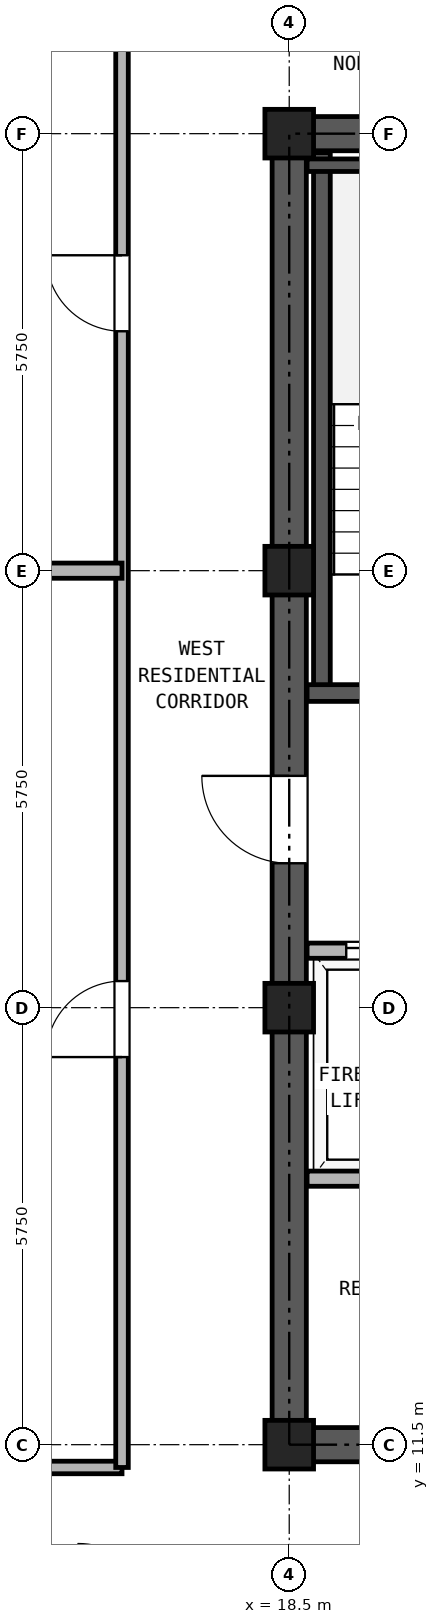
"""IFC4 building model, lengths in metres.
Left out: names, types, materials, properties, quantities, classifications, styles, units other than length and angle.
Written with IfcOpenShell. Run it as: python <this file> out.ifc"""

import sys

from ifc_helpers import new_model, si_unit, direction, frame, frame_2d, origin, origin_2d, place, context, subcontext, project, spatial, rectangle, hollow_rectangle, extrude, source, transform, mapped, element, fill, save


model = new_model("IFC4")
c1 = context("Model", 3, precision=1e-05, world=origin(), true_north=direction((0.0, 1.0)))
c2 = subcontext(c1, "Body", "Model", "MODEL_VIEW")
j1 = project(units=[si_unit("LENGTHUNIT", "METRE"), si_unit("PLANEANGLEUNIT", "RADIAN")], contexts=[c1])
p1 = place(None, origin())
s1 = spatial("IfcSite", under=j1, at=p1, CompositionType="ELEMENT")
p2 = place(p1, origin())
s2 = spatial("IfcBuilding", under=s1, at=p2, CompositionType="ELEMENT")
p3 = place(p2, frame((0.0, 0.0, 181.7)))
s3 = spatial("IfcBuildingStorey", under=s2, at=p3, CompositionType="ELEMENT", Elevation=181.7)
m1 = source(origin(), c2, "Body", "SweptSolid", [
    extrude(hollow_rectangle(XDim=0.64, YDim=0.64, WallThickness=0.035, at=origin_2d()), origin(), (0.0, 0.0, 1.0), 2.95),
])
for number, where, z_axis, x_axis in (
    (1, (18.5, 11.5, 0.0), (0.0, 0.0, 1.0), (1.0, 0.0, 0.0)),
    (2, (18.5, 17.25, 0.0), (0.0, 0.0, 1.0), (1.0, 0.0, 0.0)),
    (3, (18.5, 23.0, 0.0), (0.0, 0.0, 1.0), (1.0, 0.0, 0.0)),
    (4, (18.5, 28.75, 0.0), (0.0, 0.0, 1.0), (1.0, 0.0, 0.0)),
):
    element("IfcColumn", number, at=place(p3, frame(where, z_axis=z_axis, x_axis=x_axis)), inside=s3, PredefinedType="COLUMN", context=c2, shape_type="MappedRepresentation", body=[
        mapped(m1, transform((0.0, 0.0, 0.0), x_axis=(1.0, 0.0, 0.0), y_axis=(0.0, 1.0, 0.0), z_axis=(0.0, 0.0, 1.0), scale=1.0)),
    ])
p4 = place(p3, frame((18.275, 11.5, 0.0), z_axis=(0.0, 0.0, 1.0), x_axis=(1.0, 0.0, 0.0)))
e5 = element("IfcWall", 5, at=p4, inside=s3, PredefinedType="SHEAR", context=c2, shape_type="SweptSolid", body=[
    extrude(rectangle(XDim=10.45, YDim=0.45, at=frame_2d((5.225, 0.0))), origin(), (0.0, 0.0, 1.0), 2.95),
])
p5 = place(p4, frame((1.825, 0.0, 0.0)))
e6 = element("IfcOpeningElement", 6, at=p5, cuts=e5, PredefinedType="OPENING", context=c2, shape_type="SweptSolid", body=[
    extrude(rectangle(XDim=0.95, YDim=2.15, at=frame_2d((0.475, 1.075))), frame((0.0, 0.235, 0.0), z_axis=(0.0, -1.0, 0.0), x_axis=(1.0, 0.0, 0.0)), (0.0, 0.0, 1.0), 0.47),
])
p6 = place(p4, frame((5.325, 0.0, 0.0)))
e7 = element("IfcOpeningElement", 7, at=p6, cuts=e5, PredefinedType="OPENING", context=c2, shape_type="SweptSolid", body=[
    extrude(rectangle(XDim=0.95, YDim=2.15, at=frame_2d((0.475, 1.075))), frame((0.0, 0.235, 0.0), z_axis=(0.0, -1.0, 0.0), x_axis=(1.0, 0.0, 0.0)), (0.0, 0.0, 1.0), 0.47),
])
p7 = place(p4, frame((8.225, 0.0, 0.0)))
e8 = element("IfcOpeningElement", 8, at=p7, cuts=e5, PredefinedType="OPENING", context=c2, shape_type="SweptSolid", body=[
    extrude(rectangle(XDim=1.1, YDim=2.25, at=frame_2d((0.55, 1.125))), frame((0.0, 0.235, 0.0), z_axis=(0.0, -1.0, 0.0), x_axis=(1.0, 0.0, 0.0)), (0.0, 0.0, 1.0), 0.47),
])
p8 = place(p3, frame((18.275, 28.75, 0.0), z_axis=(0.0, 0.0, 1.0), x_axis=(1.0, 0.0, 0.0)))
e9 = element("IfcWall", 9, at=p8, inside=s3, PredefinedType="SHEAR", context=c2, shape_type="SweptSolid", body=[
    extrude(rectangle(XDim=10.45, YDim=0.45, at=frame_2d((5.225, 0.0))), origin(), (0.0, 0.0, 1.0), 2.95),
])
p9 = place(p8, frame((4.105, 0.0, 0.0)))
e10 = element("IfcOpeningElement", 10, at=p9, cuts=e9, PredefinedType="OPENING", context=c2, shape_type="SweptSolid", body=[
    extrude(rectangle(XDim=0.9, YDim=2.05, at=frame_2d((0.45, 1.025))), frame((0.0, 0.235, 0.0), z_axis=(0.0, -1.0, 0.0), x_axis=(1.0, 0.0, 0.0)), (0.0, 0.0, 1.0), 0.47),
])
p10 = place(p8, frame((5.645, 0.0, 0.0)))
e11 = element("IfcOpeningElement", 11, at=p10, cuts=e9, PredefinedType="OPENING", context=c2, shape_type="SweptSolid", body=[
    extrude(rectangle(XDim=0.9, YDim=2.05, at=frame_2d((0.45, 1.025))), frame((0.0, 0.235, 0.0), z_axis=(0.0, -1.0, 0.0), x_axis=(1.0, 0.0, 0.0)), (0.0, 0.0, 1.0), 0.47),
])
p11 = place(p3, frame((18.5, 11.725, 0.0), z_axis=(0.0, 0.0, 1.0), x_axis=(0.0, 1.0, 0.0)))
e12 = element("IfcWall", 12, at=p11, inside=s3, PredefinedType="SHEAR", context=c2, shape_type="SweptSolid", body=[
    extrude(rectangle(XDim=16.8, YDim=0.45, at=frame_2d((8.4, 0.0))), origin(), (0.0, 0.0, 1.0), 2.95),
])
p12 = place(p11, frame((7.425, 0.0, 0.0)))
e13 = element("IfcOpeningElement", 13, at=p12, cuts=e12, PredefinedType="OPENING", context=c2, shape_type="SweptSolid", body=[
    extrude(rectangle(XDim=1.15, YDim=2.2, at=frame_2d((0.575, 1.1))), frame((0.0, 0.235, 0.0), z_axis=(0.0, -1.0, 0.0), x_axis=(1.0, 0.0, 0.0)), (0.0, 0.0, 1.0), 0.47),
])
p13 = place(p3, frame((18.93, 21.39, 0.0), z_axis=(0.0, 0.0, 1.0), x_axis=(0.0, 1.0, 0.0)))
e14 = element("IfcWall", 14, at=p13, inside=s3, PredefinedType="SOLIDWALL", context=c2, shape_type="SweptSolid", body=[
    extrude(rectangle(XDim=7.11, YDim=0.22, at=frame_2d((3.555, 0.0))), origin(), (0.0, 0.0, 1.0), 2.95),
])
p14 = place(p3, frame((18.735, 28.335, 0.0), z_axis=(0.0, 0.0, 1.0), x_axis=(1.0, 0.0, 0.0)))
e15 = element("IfcWall", 15, at=p14, inside=s3, PredefinedType="PARTITIONING", context=c2, shape_type="SweptSolid", body=[
    extrude(rectangle(XDim=3.375, YDim=0.165, at=frame_2d((1.688, 0.0))), origin(), (0.0, 0.0, 1.0), 2.95),
])
p15 = place(p3, frame((18.735, 21.39, 0.0), z_axis=(0.0, 0.0, 1.0), x_axis=(1.0, 0.0, 0.0)))
e16 = element("IfcWall", 16, at=p15, inside=s3, PredefinedType="SOLIDWALL", context=c2, shape_type="SweptSolid", body=[
    extrude(rectangle(XDim=6.395, YDim=0.22, at=frame_2d((3.197, 0.0))), origin(), (0.0, 0.0, 1.0), 2.95),
])
p16 = place(p15, frame((1.115, 0.0, 0.0)))
e17 = element("IfcOpeningElement", 17, at=p16, cuts=e16, PredefinedType="OPENING", context=c2, shape_type="SweptSolid", body=[
    extrude(rectangle(XDim=1.15, YDim=2.2, at=frame_2d((0.575, 1.1))), frame((0.0, 0.12, 0.0), z_axis=(0.0, -1.0, 0.0), x_axis=(1.0, 0.0, 0.0)), (0.0, 0.0, 1.0), 0.24),
])
p17 = place(p15, frame((4.845, 0.0, 0.0)))
e18 = element("IfcOpeningElement", 18, at=p17, cuts=e16, PredefinedType="OPENING", context=c2, shape_type="SweptSolid", body=[
    extrude(rectangle(XDim=1.1, YDim=2.25, at=frame_2d((0.55, 1.125))), frame((0.0, 0.12, 0.0), z_axis=(0.0, -1.0, 0.0), x_axis=(1.0, 0.0, 0.0)), (0.0, 0.0, 1.0), 0.24),
])
p18 = place(p3, frame((18.735, 18.0, 0.0), z_axis=(0.0, 0.0, 1.0), x_axis=(1.0, 0.0, 0.0)))
e19 = element("IfcWall", 19, at=p18, inside=s3, PredefinedType="PARTITIONING", context=c2, shape_type="SweptSolid", body=[
    extrude(rectangle(XDim=9.53, YDim=0.2, at=frame_2d((4.765, 0.0))), origin(), (0.0, 0.0, 1.0), 2.95),
])
p19 = place(p18, frame((0.515, 0.0, 0.0)))
e20 = element("IfcOpeningElement", 20, at=p19, cuts=e19, PredefinedType="OPENING", context=c2, shape_type="SweptSolid", body=[
    extrude(rectangle(XDim=1.3, YDim=2.3, at=frame_2d((0.65, 1.15))), frame((0.0, 0.11, 0.0), z_axis=(0.0, -1.0, 0.0), x_axis=(1.0, 0.0, 0.0)), (0.0, 0.0, 1.0), 0.22),
])
p20 = place(p18, frame((2.615, 0.0, 0.0)))
e21 = element("IfcOpeningElement", 21, at=p20, cuts=e19, PredefinedType="OPENING", context=c2, shape_type="SweptSolid", body=[
    extrude(rectangle(XDim=1.3, YDim=2.3, at=frame_2d((0.65, 1.15))), frame((0.0, 0.11, 0.0), z_axis=(0.0, -1.0, 0.0), x_axis=(1.0, 0.0, 0.0)), (0.0, 0.0, 1.0), 0.22),
])
p21 = place(p18, frame((7.115, 0.0, 0.0)))
e22 = element("IfcOpeningElement", 22, at=p21, cuts=e19, PredefinedType="OPENING", context=c2, shape_type="SweptSolid", body=[
    extrude(rectangle(XDim=1.0, YDim=2.15, at=frame_2d((0.5, 1.075))), frame((0.0, 0.11, 0.0), z_axis=(0.0, -1.0, 0.0), x_axis=(1.0, 0.0, 0.0)), (0.0, 0.0, 1.0), 0.22),
])
p22 = place(p3, frame((18.735, 15.0, 0.0), z_axis=(0.0, 0.0, 1.0), x_axis=(1.0, 0.0, 0.0)))
e23 = element("IfcWall", 23, at=p22, inside=s3, PredefinedType="PARTITIONING", context=c2, shape_type="SweptSolid", body=[
    extrude(rectangle(XDim=9.53, YDim=0.2, at=frame_2d((4.765, 0.0))), origin(), (0.0, 0.0, 1.0), 2.95),
])
p23 = place(p3, frame((7.6, 11.2, 0.0), z_axis=(0.0, 0.0, 1.0), x_axis=(1.0, 0.0, 0.0)))
e24 = element("IfcWall", 24, at=p23, inside=s3, PredefinedType="PARTITIONING", context=c2, shape_type="SweptSolid", body=[
    extrude(rectangle(XDim=8.7, YDim=0.165, at=frame_2d((4.35, 0.0))), origin(), (0.0, 0.0, 1.0), 2.95),
])
p24 = place(p3, frame((16.3, 11.2, 0.0), z_axis=(0.0, 0.0, 1.0), x_axis=(0.0, 1.0, 0.0)))
e25 = element("IfcWall", 25, at=p24, inside=s3, PredefinedType="PARTITIONING", context=c2, shape_type="SweptSolid", body=[
    extrude(rectangle(XDim=23.94, YDim=0.165, at=frame_2d((11.97, 0.0))), origin(), (0.0, 0.0, 1.0), 2.95),
])
p25 = place(p24, frame((5.4, 0.0, 0.0)))
e26 = element("IfcOpeningElement", 26, at=p25, cuts=e25, PredefinedType="OPENING", context=c2, shape_type="SweptSolid", body=[
    extrude(rectangle(XDim=1.0, YDim=2.15, at=frame_2d((0.5, 1.075))), frame((0.0, 0.093, 0.0), z_axis=(0.0, -1.0, 0.0), x_axis=(1.0, 0.0, 0.0)), (0.0, 0.0, 1.0), 0.185),
])
p26 = place(p24, frame((14.95, 0.0, 0.0)))
e27 = element("IfcOpeningElement", 27, at=p26, cuts=e25, PredefinedType="OPENING", context=c2, shape_type="SweptSolid", body=[
    extrude(rectangle(XDim=1.0, YDim=2.15, at=frame_2d((0.5, 1.075))), frame((0.0, 0.093, 0.0), z_axis=(0.0, -1.0, 0.0), x_axis=(1.0, 0.0, 0.0)), (0.0, 0.0, 1.0), 0.185),
])
p27 = place(p3, frame((0.16, 23.0, 0.0), z_axis=(0.0, 0.0, 1.0), x_axis=(1.0, 0.0, 0.0)))
e28 = element("IfcWall", 28, at=p27, inside=s3, PredefinedType="PARTITIONING", context=c2, shape_type="SweptSolid", body=[
    extrude(rectangle(XDim=16.14, YDim=0.2, at=frame_2d((8.07, 0.0))), origin(), (0.0, 0.0, 1.0), 2.323),
])
p28 = place(p19, origin())
e29 = element("IfcDoor", 29, at=p28, inside=s3, OperationType="DOUBLE_DOOR_SLIDING", PredefinedType="DOOR", context=c2, shape_type="SweptSolid", body=[
    extrude(rectangle(XDim=1.3, YDim=2.3, at=frame_2d((0.65, 1.15))), frame((0.0, 0.025, 0.0), z_axis=(0.0, -1.0, 0.0), x_axis=(1.0, 0.0, 0.0)), (0.0, 0.0, 1.0), 0.05),
])
fill(e20, e29)
p29 = place(p12, frame((1.15, 0.0, 0.0), z_axis=(0.0, 0.0, 1.0), x_axis=(-1.0, 0.0, 0.0)))
e30 = element("IfcDoor", 30, at=p29, inside=s3, OperationType="SINGLE_SWING_RIGHT", PredefinedType="DOOR", context=c2, shape_type="SweptSolid", body=[
    extrude(rectangle(XDim=1.15, YDim=2.2, at=frame_2d((0.575, 1.1))), frame((0.0, 0.025, 0.0), z_axis=(0.0, -1.0, 0.0), x_axis=(1.0, 0.0, 0.0)), (0.0, 0.0, 1.0), 0.05),
])
fill(e13, e30)
p30 = place(p25, origin())
e31 = element("IfcDoor", 31, at=p30, inside=s3, OperationType="SINGLE_SWING_LEFT", PredefinedType="DOOR", context=c2, shape_type="SweptSolid", body=[
    extrude(rectangle(XDim=1.0, YDim=2.15, at=frame_2d((0.5, 1.075))), frame((0.0, 0.025, 0.0), z_axis=(0.0, -1.0, 0.0), x_axis=(1.0, 0.0, 0.0)), (0.0, 0.0, 1.0), 0.05),
])
fill(e26, e31)
p31 = place(p26, origin())
e32 = element("IfcDoor", 32, at=p31, inside=s3, OperationType="SINGLE_SWING_RIGHT", PredefinedType="DOOR", context=c2, shape_type="SweptSolid", body=[
    extrude(rectangle(XDim=1.0, YDim=2.15, at=frame_2d((0.5, 1.075))), frame((0.0, 0.025, 0.0), z_axis=(0.0, -1.0, 0.0), x_axis=(1.0, 0.0, 0.0)), (0.0, 0.0, 1.0), 0.05),
])
fill(e27, e32)
save(model, sys.argv[1])
